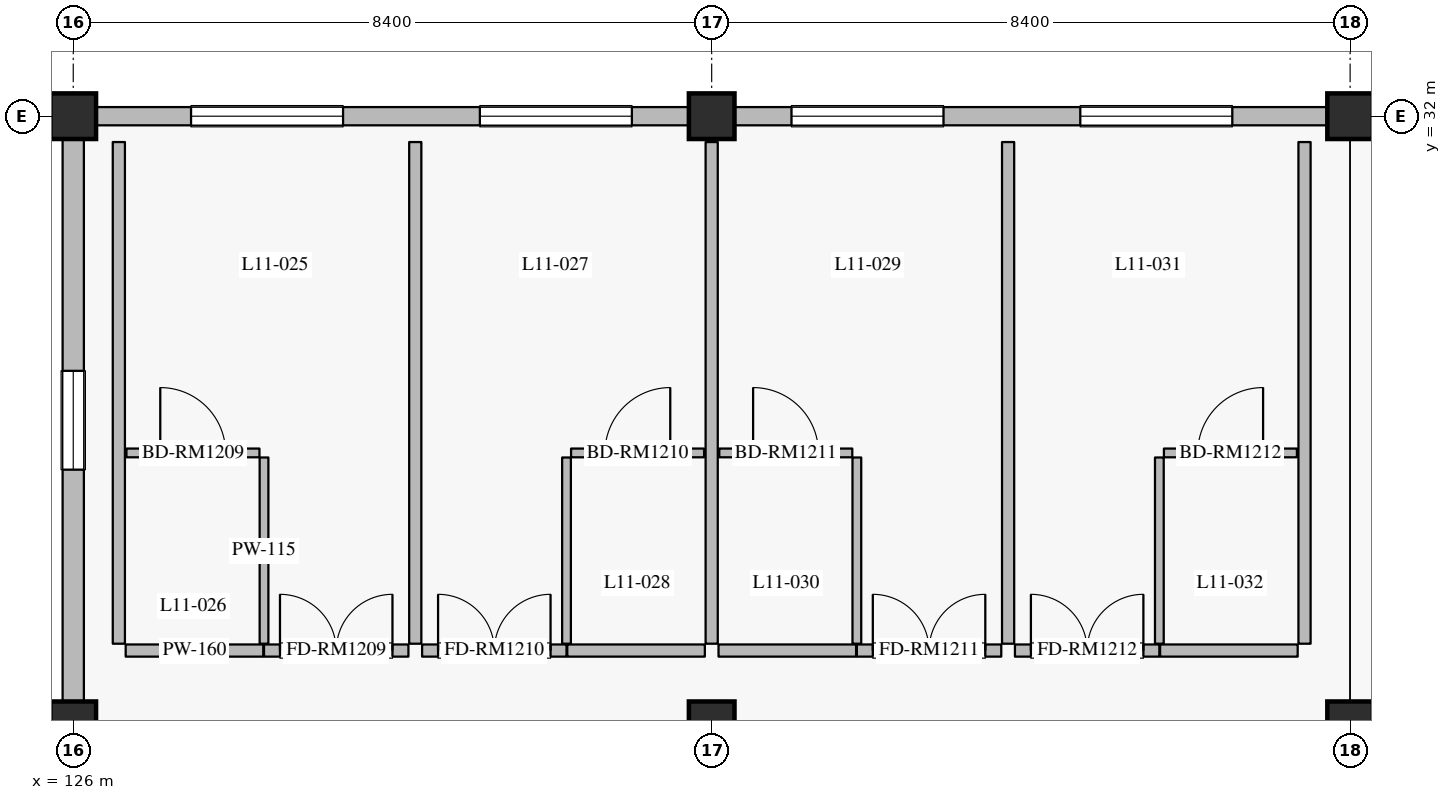
"""IFC4 building model, lengths in metres.
Left out: names, types, materials, properties, quantities, classifications, styles, units other than length and angle.
Written with IfcOpenShell. Run it as: python <this file> out.ifc"""

import sys

from ifc_helpers import new_model, si_unit, direction, frame, frame_2d, origin, origin_2d, place, context, subcontext, project, spatial, rectangle, extrude, element, fill, save


model = new_model("IFC4")
c1 = context("Model", 3, precision=1e-05, world=origin(), true_north=direction((0.0, 1.0)))
c2 = subcontext(c1, "Body", "Model", "MODEL_VIEW")
j1 = project(units=[si_unit("LENGTHUNIT", "METRE"), si_unit("PLANEANGLEUNIT", "RADIAN")], contexts=[c1])
p1 = place(None, origin())
s1 = spatial("IfcSite", under=j1, at=p1, CompositionType="ELEMENT")
p2 = place(p1, origin())
s2 = spatial("IfcBuilding", under=s1, at=p2, CompositionType="ELEMENT")
p3 = place(p2, frame((0.0, 0.0, 47.4)))
s3 = spatial("IfcBuildingStorey", under=s2, at=p3, CompositionType="ELEMENT", Elevation=47.4)
for number, where, z_axis, x_axis in (
    (1, (126.0, 32.0, 0.0), (0.0, 0.0, 1.0), (1.0, 0.0, 0.0)),
    (2, (134.4, 32.0, 0.0), (0.0, 0.0, 1.0), (1.0, 0.0, 0.0)),
    (3, (142.8, 32.0, 0.0), (0.0, 0.0, 1.0), (1.0, 0.0, 0.0)),
    (4, (126.0, 24.0, 0.0), (0.0, 0.0, 1.0), (1.0, 0.0, 0.0)),
    (5, (134.4, 24.0, 0.0), (0.0, 0.0, 1.0), (1.0, 0.0, 0.0)),
    (6, (142.8, 24.0, 0.0), (0.0, 0.0, 1.0), (1.0, 0.0, 0.0)),
):
    element("IfcColumn", number, at=place(p3, frame(where, z_axis=z_axis, x_axis=x_axis)), inside=s3, PredefinedType="COLUMN", context=c2, shape_type="SweptSolid", body=[
        extrude(rectangle(XDim=0.6, YDim=0.6, at=origin_2d()), origin(), (0.0, 0.0, 1.0), 4.2),
    ])
p4 = place(p3, frame((126.3, 32.0, 0.0), z_axis=(0.0, 0.0, 1.0), x_axis=(1.0, 0.0, 0.0)))
e7 = element("IfcWall", 7, at=p4, inside=s3, PredefinedType="SOLIDWALL", context=c2, shape_type="SweptSolid", body=[
    extrude(rectangle(XDim=7.8, YDim=0.24, at=frame_2d((3.9, 0.0))), origin(), (0.0, 0.0, 1.0), 3.49),
])
p5 = place(p4, frame((1.25, 0.0, 0.8)))
e8 = element("IfcOpeningElement", 8, at=p5, cuts=e7, PredefinedType="OPENING", context=c2, shape_type="SweptSolid", body=[
    extrude(rectangle(XDim=2.0, YDim=1.75, at=frame_2d((1.0, 0.875))), frame((0.0, 0.13, 0.0), z_axis=(0.0, -1.0, 0.0), x_axis=(1.0, 0.0, 0.0)), (0.0, 0.0, 1.0), 0.26),
])
p6 = place(p4, frame((5.05, 0.0, 0.8)))
e9 = element("IfcOpeningElement", 9, at=p6, cuts=e7, PredefinedType="OPENING", context=c2, shape_type="SweptSolid", body=[
    extrude(rectangle(XDim=2.0, YDim=1.75, at=frame_2d((1.0, 0.875))), frame((0.0, 0.13, 0.0), z_axis=(0.0, -1.0, 0.0), x_axis=(1.0, 0.0, 0.0)), (0.0, 0.0, 1.0), 0.26),
])
p7 = place(p3, frame((134.7, 32.0, 0.0), z_axis=(0.0, 0.0, 1.0), x_axis=(1.0, 0.0, 0.0)))
e10 = element("IfcWall", 10, at=p7, inside=s3, PredefinedType="SOLIDWALL", context=c2, shape_type="SweptSolid", body=[
    extrude(rectangle(XDim=7.8, YDim=0.24, at=frame_2d((3.9, 0.0))), origin(), (0.0, 0.0, 1.0), 3.49),
])
p8 = place(p7, frame((0.75, 0.0, 0.8)))
e11 = element("IfcOpeningElement", 11, at=p8, cuts=e10, PredefinedType="OPENING", context=c2, shape_type="SweptSolid", body=[
    extrude(rectangle(XDim=2.0, YDim=1.75, at=frame_2d((1.0, 0.875))), frame((0.0, 0.13, 0.0), z_axis=(0.0, -1.0, 0.0), x_axis=(1.0, 0.0, 0.0)), (0.0, 0.0, 1.0), 0.26),
])
p9 = place(p7, frame((4.55, 0.0, 0.8)))
e12 = element("IfcOpeningElement", 12, at=p9, cuts=e10, PredefinedType="OPENING", context=c2, shape_type="SweptSolid", body=[
    extrude(rectangle(XDim=2.0, YDim=1.75, at=frame_2d((1.0, 0.875))), frame((0.0, 0.13, 0.0), z_axis=(0.0, -1.0, 0.0), x_axis=(1.0, 0.0, 0.0)), (0.0, 0.0, 1.0), 0.26),
])
p10 = place(p3, frame((126.0, 24.3, 0.0), z_axis=(0.0, 0.0, 1.0), x_axis=(0.0, 1.0, 0.0)))
e13 = element("IfcWall", 13, at=p10, inside=s3, PredefinedType="SOLIDWALL", context=c2, shape_type="SweptSolid", body=[
    extrude(rectangle(XDim=7.4, YDim=0.28, at=frame_2d((3.7, 0.0))), origin(), (0.0, 0.0, 1.0), 3.3),
])
p11 = place(p10, frame((3.05, 0.0, 0.75)))
e14 = element("IfcOpeningElement", 14, at=p11, cuts=e13, PredefinedType="OPENING", context=c2, shape_type="SweptSolid", body=[
    extrude(rectangle(XDim=1.3, YDim=1.65, at=frame_2d((0.65, 0.825))), frame((0.0, 0.15, 0.0), z_axis=(0.0, -1.0, 0.0), x_axis=(1.0, 0.0, 0.0)), (0.0, 0.0, 1.0), 0.3),
])
p12 = place(p3, frame((126.69, 24.97, 0.0), z_axis=(0.0, 0.0, 1.0), x_axis=(1.0, 0.0, 0.0)))
e15 = element("IfcWall", 15, at=p12, inside=s3, PredefinedType="PARTITIONING", context=c2, shape_type="SweptSolid", body=[
    extrude(rectangle(XDim=1.81, YDim=0.16, at=frame_2d((0.905, 0.0))), origin(), (0.0, 0.0, 1.0), 3.935),
])
p13 = place(p3, frame((128.51, 24.97, 0.0), z_axis=(0.0, 0.0, 1.0), x_axis=(1.0, 0.0, 0.0)))
e16 = element("IfcWall", 16, at=p13, inside=s3, PredefinedType="PARTITIONING", context=c2, shape_type="SweptSolid", body=[
    extrude(rectangle(XDim=1.9, YDim=0.16, at=frame_2d((0.95, 0.0))), origin(), (0.0, 0.0, 1.0), 3.935),
])
p14 = place(p13, frame((0.21, 0.0, 0.0)))
e17 = element("IfcOpeningElement", 17, at=p14, cuts=e16, PredefinedType="OPENING", context=c2, shape_type="SweptSolid", body=[
    extrude(rectangle(XDim=1.48, YDim=2.35, at=frame_2d((0.74, 1.175))), frame((0.0, 0.09, 0.0), z_axis=(0.0, -1.0, 0.0), x_axis=(1.0, 0.0, 0.0)), (0.0, 0.0, 1.0), 0.18),
])
p15 = place(p3, frame((128.51, 25.06, 0.0), z_axis=(0.0, 0.0, 1.0), x_axis=(0.0, 1.0, 0.0)))
e18 = element("IfcWall", 18, at=p15, inside=s3, PredefinedType="PARTITIONING", context=c2, shape_type="SweptSolid", body=[
    extrude(rectangle(XDim=2.45, YDim=0.115, at=frame_2d((1.225, 0.0))), origin(), (0.0, 0.0, 1.0), 3.935),
])
p16 = place(p3, frame((126.7, 27.57, 0.0), z_axis=(0.0, 0.0, 1.0), x_axis=(1.0, 0.0, 0.0)))
e19 = element("IfcWall", 19, at=p16, inside=s3, PredefinedType="PARTITIONING", context=c2, shape_type="SweptSolid", body=[
    extrude(rectangle(XDim=1.75, YDim=0.115, at=frame_2d((0.875, 0.0))), origin(), (0.0, 0.0, 1.0), 3.935),
])
p17 = place(p16, frame((0.445, 0.0, 0.0)))
e20 = element("IfcOpeningElement", 20, at=p17, cuts=e19, PredefinedType="OPENING", context=c2, shape_type="SweptSolid", body=[
    extrude(rectangle(XDim=0.86, YDim=2.12, at=frame_2d((0.43, 1.06))), frame((0.0, 0.067, 0.0), z_axis=(0.0, -1.0, 0.0), x_axis=(1.0, 0.0, 0.0)), (0.0, 0.0, 1.0), 0.135),
])
p18 = place(p3, frame((126.6, 25.06, 0.0), z_axis=(0.0, 0.0, 1.0), x_axis=(0.0, 1.0, 0.0)))
e21 = element("IfcWall", 21, at=p18, inside=s3, PredefinedType="PARTITIONING", context=c2, shape_type="SweptSolid", body=[
    extrude(rectangle(XDim=6.6, YDim=0.16, at=frame_2d((3.3, 0.0))), origin(), (0.0, 0.0, 1.0), 3.935),
])
p19 = place(p3, frame((130.59, 24.97, 0.0), z_axis=(0.0, 0.0, 1.0), x_axis=(1.0, 0.0, 0.0)))
e22 = element("IfcWall", 22, at=p19, inside=s3, PredefinedType="PARTITIONING", context=c2, shape_type="SweptSolid", body=[
    extrude(rectangle(XDim=1.9, YDim=0.16, at=frame_2d((0.95, 0.0))), origin(), (0.0, 0.0, 1.0), 3.935),
])
p20 = place(p19, frame((0.21, 0.0, 0.0)))
e23 = element("IfcOpeningElement", 23, at=p20, cuts=e22, PredefinedType="OPENING", context=c2, shape_type="SweptSolid", body=[
    extrude(rectangle(XDim=1.48, YDim=2.35, at=frame_2d((0.74, 1.175))), frame((0.0, 0.09, 0.0), z_axis=(0.0, -1.0, 0.0), x_axis=(1.0, 0.0, 0.0)), (0.0, 0.0, 1.0), 0.18),
])
p21 = place(p3, frame((132.5, 24.97, 0.0), z_axis=(0.0, 0.0, 1.0), x_axis=(1.0, 0.0, 0.0)))
e24 = element("IfcWall", 24, at=p21, inside=s3, PredefinedType="PARTITIONING", context=c2, shape_type="SweptSolid", body=[
    extrude(rectangle(XDim=1.81, YDim=0.16, at=frame_2d((0.905, 0.0))), origin(), (0.0, 0.0, 1.0), 3.935),
])
p22 = place(p3, frame((132.49, 25.06, 0.0), z_axis=(0.0, 0.0, 1.0), x_axis=(0.0, 1.0, 0.0)))
e25 = element("IfcWall", 25, at=p22, inside=s3, PredefinedType="PARTITIONING", context=c2, shape_type="SweptSolid", body=[
    extrude(rectangle(XDim=2.45, YDim=0.115, at=frame_2d((1.225, 0.0))), origin(), (0.0, 0.0, 1.0), 3.935),
])
p23 = place(p3, frame((132.55, 27.57, 0.0), z_axis=(0.0, 0.0, 1.0), x_axis=(1.0, 0.0, 0.0)))
e26 = element("IfcWall", 26, at=p23, inside=s3, PredefinedType="PARTITIONING", context=c2, shape_type="SweptSolid", body=[
    extrude(rectangle(XDim=1.75, YDim=0.115, at=frame_2d((0.875, 0.0))), origin(), (0.0, 0.0, 1.0), 3.935),
])
p24 = place(p23, frame((0.445, 0.0, 0.0)))
e27 = element("IfcOpeningElement", 27, at=p24, cuts=e26, PredefinedType="OPENING", context=c2, shape_type="SweptSolid", body=[
    extrude(rectangle(XDim=0.86, YDim=2.12, at=frame_2d((0.43, 1.06))), frame((0.0, 0.067, 0.0), z_axis=(0.0, -1.0, 0.0), x_axis=(1.0, 0.0, 0.0)), (0.0, 0.0, 1.0), 0.135),
])
p25 = place(p3, frame((130.5, 25.06, 0.0), z_axis=(0.0, 0.0, 1.0), x_axis=(0.0, 1.0, 0.0)))
e28 = element("IfcWall", 28, at=p25, inside=s3, PredefinedType="PARTITIONING", context=c2, shape_type="SweptSolid", body=[
    extrude(rectangle(XDim=6.6, YDim=0.16, at=frame_2d((3.3, 0.0))), origin(), (0.0, 0.0, 1.0), 3.935),
])
p26 = place(p3, frame((134.49, 24.97, 0.0), z_axis=(0.0, 0.0, 1.0), x_axis=(1.0, 0.0, 0.0)))
e29 = element("IfcWall", 29, at=p26, inside=s3, PredefinedType="PARTITIONING", context=c2, shape_type="SweptSolid", body=[
    extrude(rectangle(XDim=1.81, YDim=0.16, at=frame_2d((0.905, 0.0))), origin(), (0.0, 0.0, 1.0), 3.935),
])
p27 = place(p3, frame((136.31, 24.97, 0.0), z_axis=(0.0, 0.0, 1.0), x_axis=(1.0, 0.0, 0.0)))
e30 = element("IfcWall", 30, at=p27, inside=s3, PredefinedType="PARTITIONING", context=c2, shape_type="SweptSolid", body=[
    extrude(rectangle(XDim=1.9, YDim=0.16, at=frame_2d((0.95, 0.0))), origin(), (0.0, 0.0, 1.0), 3.935),
])
p28 = place(p27, frame((0.21, 0.0, 0.0)))
e31 = element("IfcOpeningElement", 31, at=p28, cuts=e30, PredefinedType="OPENING", context=c2, shape_type="SweptSolid", body=[
    extrude(rectangle(XDim=1.48, YDim=2.35, at=frame_2d((0.74, 1.175))), frame((0.0, 0.09, 0.0), z_axis=(0.0, -1.0, 0.0), x_axis=(1.0, 0.0, 0.0)), (0.0, 0.0, 1.0), 0.18),
])
p29 = place(p3, frame((136.31, 25.06, 0.0), z_axis=(0.0, 0.0, 1.0), x_axis=(0.0, 1.0, 0.0)))
e32 = element("IfcWall", 32, at=p29, inside=s3, PredefinedType="PARTITIONING", context=c2, shape_type="SweptSolid", body=[
    extrude(rectangle(XDim=2.45, YDim=0.115, at=frame_2d((1.225, 0.0))), origin(), (0.0, 0.0, 1.0), 3.935),
])
p30 = place(p3, frame((134.5, 27.57, 0.0), z_axis=(0.0, 0.0, 1.0), x_axis=(1.0, 0.0, 0.0)))
e33 = element("IfcWall", 33, at=p30, inside=s3, PredefinedType="PARTITIONING", context=c2, shape_type="SweptSolid", body=[
    extrude(rectangle(XDim=1.75, YDim=0.115, at=frame_2d((0.875, 0.0))), origin(), (0.0, 0.0, 1.0), 3.935),
])
p31 = place(p30, frame((0.445, 0.0, 0.0)))
e34 = element("IfcOpeningElement", 34, at=p31, cuts=e33, PredefinedType="OPENING", context=c2, shape_type="SweptSolid", body=[
    extrude(rectangle(XDim=0.86, YDim=2.12, at=frame_2d((0.43, 1.06))), frame((0.0, 0.067, 0.0), z_axis=(0.0, -1.0, 0.0), x_axis=(1.0, 0.0, 0.0)), (0.0, 0.0, 1.0), 0.135),
])
p32 = place(p3, frame((134.4, 25.06, 0.0), z_axis=(0.0, 0.0, 1.0), x_axis=(0.0, 1.0, 0.0)))
e35 = element("IfcWall", 35, at=p32, inside=s3, PredefinedType="PARTITIONING", context=c2, shape_type="SweptSolid", body=[
    extrude(rectangle(XDim=6.6, YDim=0.16, at=frame_2d((3.3, 0.0))), origin(), (0.0, 0.0, 1.0), 3.29),
])
p33 = place(p3, frame((138.39, 24.97, 0.0), z_axis=(0.0, 0.0, 1.0), x_axis=(1.0, 0.0, 0.0)))
e36 = element("IfcWall", 36, at=p33, inside=s3, PredefinedType="PARTITIONING", context=c2, shape_type="SweptSolid", body=[
    extrude(rectangle(XDim=1.9, YDim=0.16, at=frame_2d((0.95, 0.0))), origin(), (0.0, 0.0, 1.0), 3.935),
])
p34 = place(p33, frame((0.21, 0.0, 0.0)))
e37 = element("IfcOpeningElement", 37, at=p34, cuts=e36, PredefinedType="OPENING", context=c2, shape_type="SweptSolid", body=[
    extrude(rectangle(XDim=1.48, YDim=2.35, at=frame_2d((0.74, 1.175))), frame((0.0, 0.09, 0.0), z_axis=(0.0, -1.0, 0.0), x_axis=(1.0, 0.0, 0.0)), (0.0, 0.0, 1.0), 0.18),
])
p35 = place(p3, frame((140.3, 24.97, 0.0), z_axis=(0.0, 0.0, 1.0), x_axis=(1.0, 0.0, 0.0)))
e38 = element("IfcWall", 38, at=p35, inside=s3, PredefinedType="PARTITIONING", context=c2, shape_type="SweptSolid", body=[
    extrude(rectangle(XDim=1.81, YDim=0.16, at=frame_2d((0.905, 0.0))), origin(), (0.0, 0.0, 1.0), 3.935),
])
p36 = place(p3, frame((140.29, 25.06, 0.0), z_axis=(0.0, 0.0, 1.0), x_axis=(0.0, 1.0, 0.0)))
e39 = element("IfcWall", 39, at=p36, inside=s3, PredefinedType="PARTITIONING", context=c2, shape_type="SweptSolid", body=[
    extrude(rectangle(XDim=2.45, YDim=0.115, at=frame_2d((1.225, 0.0))), origin(), (0.0, 0.0, 1.0), 3.935),
])
p37 = place(p3, frame((140.35, 27.57, 0.0), z_axis=(0.0, 0.0, 1.0), x_axis=(1.0, 0.0, 0.0)))
e40 = element("IfcWall", 40, at=p37, inside=s3, PredefinedType="PARTITIONING", context=c2, shape_type="SweptSolid", body=[
    extrude(rectangle(XDim=1.75, YDim=0.115, at=frame_2d((0.875, 0.0))), origin(), (0.0, 0.0, 1.0), 3.935),
])
p38 = place(p37, frame((0.445, 0.0, 0.0)))
e41 = element("IfcOpeningElement", 41, at=p38, cuts=e40, PredefinedType="OPENING", context=c2, shape_type="SweptSolid", body=[
    extrude(rectangle(XDim=0.86, YDim=2.12, at=frame_2d((0.43, 1.06))), frame((0.0, 0.067, 0.0), z_axis=(0.0, -1.0, 0.0), x_axis=(1.0, 0.0, 0.0)), (0.0, 0.0, 1.0), 0.135),
])
for number, where, z_axis, x_axis in (
    (42, (138.3, 25.06, 0.0), (0.0, 0.0, 1.0), (0.0, 1.0, 0.0)),
    (43, (142.2, 25.06, 0.0), (0.0, 0.0, 1.0), (0.0, 1.0, 0.0)),
):
    element("IfcWall", number, at=place(p3, frame(where, z_axis=z_axis, x_axis=x_axis)), inside=s3, PredefinedType="PARTITIONING", context=c2, shape_type="SweptSolid", body=[
        extrude(rectangle(XDim=6.6, YDim=0.16, at=frame_2d((3.3, 0.0))), origin(), (0.0, 0.0, 1.0), 3.935),
    ])
p39 = place(p5, origin())
e44 = element("IfcWindow", 44, at=p39, inside=s3, PartitioningType="DOUBLE_PANEL_VERTICAL", PredefinedType="WINDOW", context=c2, shape_type="SweptSolid", body=[
    extrude(rectangle(XDim=2.0, YDim=1.75, at=frame_2d((1.0, 0.875))), frame((0.0, 0.03, 0.0), z_axis=(0.0, -1.0, 0.0), x_axis=(1.0, 0.0, 0.0)), (0.0, 0.0, 1.0), 0.06),
])
fill(e8, e44)
p40 = place(p6, origin())
e45 = element("IfcWindow", 45, at=p40, inside=s3, PartitioningType="DOUBLE_PANEL_VERTICAL", PredefinedType="WINDOW", context=c2, shape_type="SweptSolid", body=[
    extrude(rectangle(XDim=2.0, YDim=1.75, at=frame_2d((1.0, 0.875))), frame((0.0, 0.03, 0.0), z_axis=(0.0, -1.0, 0.0), x_axis=(1.0, 0.0, 0.0)), (0.0, 0.0, 1.0), 0.06),
])
fill(e9, e45)
p41 = place(p8, origin())
e46 = element("IfcWindow", 46, at=p41, inside=s3, PartitioningType="DOUBLE_PANEL_VERTICAL", PredefinedType="WINDOW", context=c2, shape_type="SweptSolid", body=[
    extrude(rectangle(XDim=2.0, YDim=1.75, at=frame_2d((1.0, 0.875))), frame((0.0, 0.03, 0.0), z_axis=(0.0, -1.0, 0.0), x_axis=(1.0, 0.0, 0.0)), (0.0, 0.0, 1.0), 0.06),
])
fill(e11, e46)
p42 = place(p9, origin())
e47 = element("IfcWindow", 47, at=p42, inside=s3, PartitioningType="DOUBLE_PANEL_VERTICAL", PredefinedType="WINDOW", context=c2, shape_type="SweptSolid", body=[
    extrude(rectangle(XDim=2.0, YDim=1.75, at=frame_2d((1.0, 0.875))), frame((0.0, 0.03, 0.0), z_axis=(0.0, -1.0, 0.0), x_axis=(1.0, 0.0, 0.0)), (0.0, 0.0, 1.0), 0.06),
])
fill(e12, e47)
p43 = place(p11, origin())
e48 = element("IfcWindow", 48, at=p43, inside=s3, PartitioningType="SINGLE_PANEL", PredefinedType="WINDOW", context=c2, shape_type="SweptSolid", body=[
    extrude(rectangle(XDim=1.3, YDim=1.65, at=frame_2d((0.65, 0.825))), frame((0.0, 0.03, 0.0), z_axis=(0.0, -1.0, 0.0), x_axis=(1.0, 0.0, 0.0)), (0.0, 0.0, 1.0), 0.06),
])
fill(e14, e48)
p44 = place(p14, origin())
e49 = element("IfcDoor", 49, at=p44, inside=s3, OperationType="DOUBLE_DOOR_SINGLE_SWING", PredefinedType="DOOR", context=c2, shape_type="SweptSolid", body=[
    extrude(rectangle(XDim=1.48, YDim=2.35, at=frame_2d((0.74, 1.175))), frame((0.0, 0.025, 0.0), z_axis=(0.0, -1.0, 0.0), x_axis=(1.0, 0.0, 0.0)), (0.0, 0.0, 1.0), 0.05),
])
fill(e17, e49)
p45 = place(p17, origin())
e50 = element("IfcDoor", 50, at=p45, inside=s3, OperationType="SINGLE_SWING_LEFT", PredefinedType="DOOR", context=c2, shape_type="SweptSolid", body=[
    extrude(rectangle(XDim=0.86, YDim=2.12, at=frame_2d((0.43, 1.06))), frame((0.0, 0.025, 0.0), z_axis=(0.0, -1.0, 0.0), x_axis=(1.0, 0.0, 0.0)), (0.0, 0.0, 1.0), 0.05),
])
fill(e20, e50)
p46 = place(p20, origin())
e51 = element("IfcDoor", 51, at=p46, inside=s3, OperationType="DOUBLE_DOOR_SINGLE_SWING", PredefinedType="DOOR", context=c2, shape_type="SweptSolid", body=[
    extrude(rectangle(XDim=1.48, YDim=2.35, at=frame_2d((0.74, 1.175))), frame((0.0, 0.025, 0.0), z_axis=(0.0, -1.0, 0.0), x_axis=(1.0, 0.0, 0.0)), (0.0, 0.0, 1.0), 0.05),
])
fill(e23, e51)
p47 = place(p24, origin())
e52 = element("IfcDoor", 52, at=p47, inside=s3, OperationType="SINGLE_SWING_RIGHT", PredefinedType="DOOR", context=c2, shape_type="SweptSolid", body=[
    extrude(rectangle(XDim=0.86, YDim=2.12, at=frame_2d((0.43, 1.06))), frame((0.0, 0.025, 0.0), z_axis=(0.0, -1.0, 0.0), x_axis=(1.0, 0.0, 0.0)), (0.0, 0.0, 1.0), 0.05),
])
fill(e27, e52)
p48 = place(p28, origin())
e53 = element("IfcDoor", 53, at=p48, inside=s3, OperationType="DOUBLE_DOOR_SINGLE_SWING", PredefinedType="DOOR", context=c2, shape_type="SweptSolid", body=[
    extrude(rectangle(XDim=1.48, YDim=2.35, at=frame_2d((0.74, 1.175))), frame((0.0, 0.025, 0.0), z_axis=(0.0, -1.0, 0.0), x_axis=(1.0, 0.0, 0.0)), (0.0, 0.0, 1.0), 0.05),
])
fill(e31, e53)
p49 = place(p31, origin())
e54 = element("IfcDoor", 54, at=p49, inside=s3, OperationType="SINGLE_SWING_LEFT", PredefinedType="DOOR", context=c2, shape_type="SweptSolid", body=[
    extrude(rectangle(XDim=0.86, YDim=2.12, at=frame_2d((0.43, 1.06))), frame((0.0, 0.025, 0.0), z_axis=(0.0, -1.0, 0.0), x_axis=(1.0, 0.0, 0.0)), (0.0, 0.0, 1.0), 0.05),
])
fill(e34, e54)
p50 = place(p34, origin())
e55 = element("IfcDoor", 55, at=p50, inside=s3, OperationType="DOUBLE_DOOR_SINGLE_SWING", PredefinedType="DOOR", context=c2, shape_type="SweptSolid", body=[
    extrude(rectangle(XDim=1.48, YDim=2.35, at=frame_2d((0.74, 1.175))), frame((0.0, 0.025, 0.0), z_axis=(0.0, -1.0, 0.0), x_axis=(1.0, 0.0, 0.0)), (0.0, 0.0, 1.0), 0.05),
])
fill(e37, e55)
p51 = place(p38, origin())
e56 = element("IfcDoor", 56, at=p51, inside=s3, OperationType="SINGLE_SWING_RIGHT", PredefinedType="DOOR", context=c2, shape_type="SweptSolid", body=[
    extrude(rectangle(XDim=0.86, YDim=2.12, at=frame_2d((0.43, 1.06))), frame((0.0, 0.025, 0.0), z_axis=(0.0, -1.0, 0.0), x_axis=(1.0, 0.0, 0.0)), (0.0, 0.0, 1.0), 0.05),
])
fill(e41, e56)
save(model, sys.argv[1])
